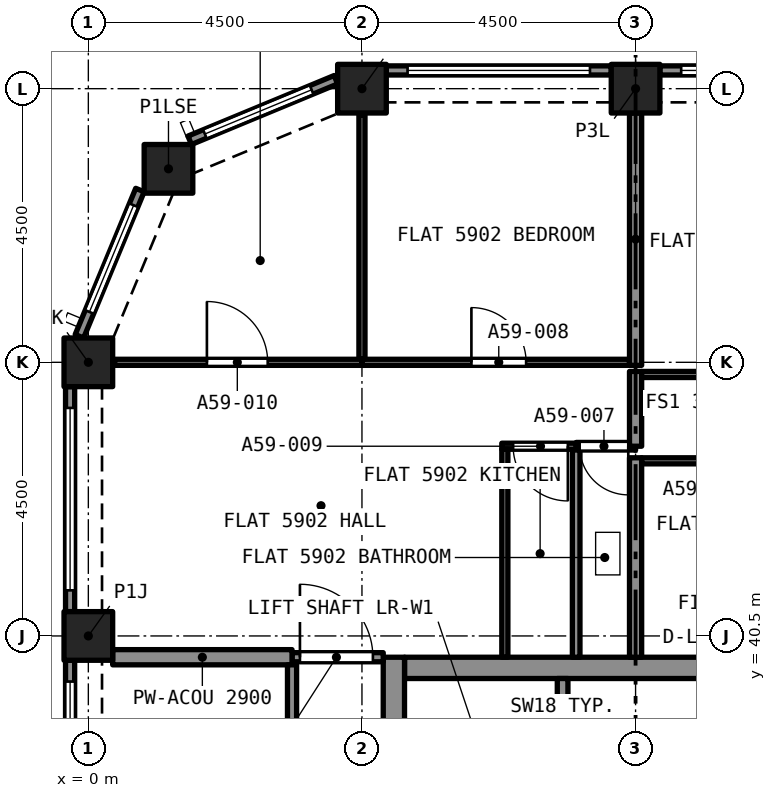
"""IFC4 building model, lengths in metres.
Left out: names, types, materials, properties, quantities, classifications, styles, units other than length and angle.
Written with IfcOpenShell. Run it as: python <this file> out.ifc"""

import sys

from ifc_helpers import new_model, si_unit, direction, frame, frame_2d, origin, origin_2d, place, context, subcontext, project, spatial, rectangle, extrude, element, fill, save


model = new_model("IFC4")
c1 = context("Model", 3, precision=1e-05, world=origin(), true_north=direction((0.0, 1.0)))
c2 = subcontext(c1, "Body", "Model", "MODEL_VIEW")
j1 = project(units=[si_unit("LENGTHUNIT", "METRE"), si_unit("PLANEANGLEUNIT", "RADIAN")], contexts=[c1])
p1 = place(None, origin())
s1 = spatial("IfcSite", under=j1, at=p1, CompositionType="ELEMENT")
p2 = place(p1, origin())
s2 = spatial("IfcBuilding", under=s1, at=p2, CompositionType="ELEMENT")
p3 = place(p2, frame((0.0, 0.0, 213.295)))
s3 = spatial("IfcBuildingStorey", under=s2, at=p3, CompositionType="ELEMENT", Elevation=213.295)
for number, where, z_axis, x_axis in (
    (1, (0.0, 40.5, 0.0), (0.0, 0.0, 1.0), (1.0, 0.0, 0.0)),
    (2, (0.0, 45.0, 0.0), (0.0, 0.0, 1.0), (1.0, 0.0, 0.0)),
    (3, (1.318, 48.182, 0.0), (0.0, 0.0, 1.0), (1.0, 0.0, 0.0)),
    (4, (4.5, 49.5, 0.0), (0.0, 0.0, 1.0), (1.0, 0.0, 0.0)),
    (5, (9.0, 49.5, 0.0), (0.0, 0.0, 1.0), (1.0, 0.0, 0.0)),
):
    element("IfcColumn", number, at=place(p3, frame(where, z_axis=z_axis, x_axis=x_axis)), inside=s3, PredefinedType="COLUMN", context=c2, shape_type="SweptSolid", body=[
        extrude(rectangle(XDim=0.8, YDim=0.8, at=origin_2d()), origin(), (0.0, 0.0, 1.0), 3.2),
    ])
p4 = place(p3, frame((5.2, 39.975, 0.0), z_axis=(0.0, 0.0, 1.0), x_axis=(1.0, 0.0, 0.0)))
e6 = element("IfcWall", 6, at=p4, inside=s3, PredefinedType="SOLIDWALL", context=c2, shape_type="SweptSolid", body=[
    extrude(rectangle(XDim=7.6, YDim=0.35, at=frame_2d((3.8, 0.0))), origin(), (0.0, 0.0, 1.0), 3.2),
])
p5 = place(p3, frame((5.025, 27.35, 0.0), z_axis=(0.0, 0.0, 1.0), x_axis=(0.0, 1.0, 0.0)))
e7 = element("IfcWall", 7, at=p5, inside=s3, PredefinedType="SOLIDWALL", context=c2, shape_type="SweptSolid", body=[
    extrude(rectangle(XDim=12.8, YDim=0.35, at=frame_2d((6.4, 0.0))), origin(), (0.0, 0.0, 1.0), 3.2),
])
p6 = place(p5, frame((8.6, 0.0, 0.0)))
e8 = element("IfcOpeningElement", 8, at=p6, cuts=e7, PredefinedType="OPENING", context=c2, shape_type="SweptSolid", body=[
    extrude(rectangle(XDim=1.2, YDim=2.1, at=frame_2d((0.6, 1.05))), frame((0.0, 0.185, 0.0), z_axis=(0.0, -1.0, 0.0), x_axis=(1.0, 0.0, 0.0)), (0.0, 0.0, 1.0), 0.37),
])
p7 = place(p3, frame((9.4, 49.8, 0.0), z_axis=(0.0, 0.0, 1.0), x_axis=(1.0, 0.0, 0.0)))
e9 = element("IfcWall", 9, at=p7, inside=s3, PredefinedType="SOLIDWALL", context=c2, shape_type="SweptSolid", body=[
    extrude(rectangle(XDim=3.7, YDim=0.15, at=frame_2d((1.85, 0.0))), origin(), (0.0, 0.0, 1.0), 3.2),
])
p8 = place(p7, frame((0.35, 0.0, 0.45)))
e10 = element("IfcOpeningElement", 10, at=p8, cuts=e9, PredefinedType="OPENING", context=c2, shape_type="SweptSolid", body=[
    extrude(rectangle(XDim=3.0, YDim=1.95, at=frame_2d((1.5, 0.975))), frame((0.0, 0.085, 0.0), z_axis=(0.0, -1.0, 0.0), x_axis=(1.0, 0.0, 0.0)), (0.0, 0.0, 1.0), 0.17),
])
p9 = place(p3, frame((4.9, 49.8, 0.0), z_axis=(0.0, 0.0, 1.0), x_axis=(1.0, 0.0, 0.0)))
e11 = element("IfcWall", 11, at=p9, inside=s3, PredefinedType="SOLIDWALL", context=c2, shape_type="SweptSolid", body=[
    extrude(rectangle(XDim=3.7, YDim=0.15, at=frame_2d((1.85, 0.0))), origin(), (0.0, 0.0, 1.0), 3.2),
])
p10 = place(p9, frame((0.35, 0.0, 0.45)))
e12 = element("IfcOpeningElement", 12, at=p10, cuts=e11, PredefinedType="OPENING", context=c2, shape_type="SweptSolid", body=[
    extrude(rectangle(XDim=3.0, YDim=1.95, at=frame_2d((1.5, 0.975))), frame((0.0, 0.085, 0.0), z_axis=(0.0, -1.0, 0.0), x_axis=(1.0, 0.0, 0.0)), (0.0, 0.0, 1.0), 0.17),
])
p11 = place(p3, frame((1.667, 48.651, 0.0), z_axis=(0.0, 0.0, 1.0), x_axis=(0.923885342263, 0.382669406082, 0.0)))
e13 = element("IfcWall", 13, at=p11, inside=s3, PredefinedType="SOLIDWALL", context=c2, shape_type="SweptSolid", body=[
    extrude(rectangle(XDim=2.602, YDim=0.15, at=frame_2d((1.301, 0.0))), origin(), (0.0, 0.0, 1.0), 3.2),
])
p12 = place(p11, frame((0.27, 0.0, 0.45)))
e14 = element("IfcOpeningElement", 14, at=p12, cuts=e13, PredefinedType="OPENING", context=c2, shape_type="SweptSolid", body=[
    extrude(rectangle(XDim=1.9, YDim=1.95, at=frame_2d((0.95, 0.975))), frame((0.0, 0.085, 0.0), z_axis=(0.0, -1.0, 0.0), x_axis=(1.0, 0.0, 0.0)), (0.0, 0.0, 1.0), 0.17),
])
p13 = place(p3, frame((-0.147, 45.429, 0.0), z_axis=(0.0, 0.0, 1.0), x_axis=(0.382669406082, 0.923885342263, 0.0)))
e15 = element("IfcWall", 15, at=p13, inside=s3, PredefinedType="SOLIDWALL", context=c2, shape_type="SweptSolid", body=[
    extrude(rectangle(XDim=2.602, YDim=0.15, at=frame_2d((1.301, 0.0))), origin(), (0.0, 0.0, 1.0), 3.2),
])
p14 = place(p13, frame((0.432, 0.0, 0.45)))
e16 = element("IfcOpeningElement", 16, at=p14, cuts=e15, PredefinedType="OPENING", context=c2, shape_type="SweptSolid", body=[
    extrude(rectangle(XDim=1.9, YDim=1.95, at=frame_2d((0.95, 0.975))), frame((0.0, 0.085, 0.0), z_axis=(0.0, -1.0, 0.0), x_axis=(1.0, 0.0, 0.0)), (0.0, 0.0, 1.0), 0.17),
])
p15 = place(p3, frame((-0.3, 40.9, 0.0), z_axis=(0.0, 0.0, 1.0), x_axis=(0.0, 1.0, 0.0)))
e17 = element("IfcWall", 17, at=p15, inside=s3, PredefinedType="SOLIDWALL", context=c2, shape_type="SweptSolid", body=[
    extrude(rectangle(XDim=3.7, YDim=0.15, at=frame_2d((1.85, 0.0))), origin(), (0.0, 0.0, 1.0), 3.2),
])
p16 = place(p15, frame((0.35, 0.0, 0.45)))
e18 = element("IfcOpeningElement", 18, at=p16, cuts=e17, PredefinedType="OPENING", context=c2, shape_type="SweptSolid", body=[
    extrude(rectangle(XDim=3.0, YDim=1.95, at=frame_2d((1.5, 0.975))), frame((0.0, 0.085, 0.0), z_axis=(0.0, -1.0, 0.0), x_axis=(1.0, 0.0, 0.0)), (0.0, 0.0, 1.0), 0.17),
])
p17 = place(p3, frame((-0.3, 36.4, 0.0), z_axis=(0.0, 0.0, 1.0), x_axis=(0.0, 1.0, 0.0)))
e19 = element("IfcWall", 19, at=p17, inside=s3, PredefinedType="SOLIDWALL", context=c2, shape_type="SweptSolid", body=[
    extrude(rectangle(XDim=3.7, YDim=0.15, at=frame_2d((1.85, 0.0))), origin(), (0.0, 0.0, 1.0), 3.2),
])
p18 = place(p17, frame((0.35, 0.0, 0.45)))
e20 = element("IfcOpeningElement", 20, at=p18, cuts=e19, PredefinedType="OPENING", context=c2, shape_type="SweptSolid", body=[
    extrude(rectangle(XDim=3.0, YDim=1.95, at=frame_2d((1.5, 0.975))), frame((0.0, 0.085, 0.0), z_axis=(0.0, -1.0, 0.0), x_axis=(1.0, 0.0, 0.0)), (0.0, 0.0, 1.0), 0.17),
])
p19 = place(p3, frame((9.0, 43.62, 0.0), z_axis=(0.0, 0.0, 1.0), x_axis=(-1.0, 0.0, 0.0)))
e21 = element("IfcWall", 21, at=p19, inside=s3, PredefinedType="PARTITIONING", context=c2, shape_type="SweptSolid", body=[
    extrude(rectangle(XDim=0.977, YDim=0.125, at=frame_2d((0.489, 0.0))), origin(), (0.0, 0.0, 1.0), 2.9),
])
p20 = place(p19, frame((0.12, 0.0, 0.0)))
e22 = element("IfcOpeningElement", 22, at=p20, cuts=e21, PredefinedType="OPENING", context=c2, shape_type="SweptSolid", body=[
    extrude(rectangle(XDim=0.8, YDim=2.1, at=frame_2d((0.4, 1.05))), frame((0.0, 0.073, 0.0), z_axis=(0.0, -1.0, 0.0), x_axis=(1.0, 0.0, 0.0)), (0.0, 0.0, 1.0), 0.145),
])
p21 = place(p3, frame((8.023, 40.15, 0.0), z_axis=(0.0, 0.0, 1.0), x_axis=(0.0, 1.0, 0.0)))
e23 = element("IfcWall", 23, at=p21, inside=s3, PredefinedType="PARTITIONING", context=c2, shape_type="SweptSolid", body=[
    extrude(rectangle(XDim=3.408, YDim=0.125, at=frame_2d((1.704, 0.0))), origin(), (0.0, 0.0, 1.0), 2.9),
])
p22 = place(p3, frame((9.0, 40.15, 0.0), z_axis=(0.0, 0.0, 1.0), x_axis=(0.0, 1.0, 0.0)))
e24 = element("IfcWall", 24, at=p22, inside=s3, PredefinedType="PARTITIONING", context=c2, shape_type="SweptSolid", body=[
    extrude(rectangle(XDim=3.28, YDim=0.2, at=frame_2d((1.64, 0.0))), origin(), (0.0, 0.0, 1.0), 2.9),
])
p23 = place(p3, frame((4.5, 45.0, 0.0), z_axis=(0.0, 0.0, 1.0), x_axis=(1.0, 0.0, 0.0)))
e25 = element("IfcWall", 25, at=p23, inside=s3, PredefinedType="PARTITIONING", context=c2, shape_type="SweptSolid", body=[
    extrude(rectangle(XDim=4.4, YDim=0.1, at=frame_2d((2.2, 0.0))), origin(), (0.0, 0.0, 1.0), 2.9),
])
p24 = place(p23, frame((1.8, 0.0, 0.0)))
e26 = element("IfcOpeningElement", 26, at=p24, cuts=e25, PredefinedType="OPENING", context=c2, shape_type="SweptSolid", body=[
    extrude(rectangle(XDim=0.9, YDim=2.1, at=frame_2d((0.45, 1.05))), frame((0.0, 0.06, 0.0), z_axis=(0.0, -1.0, 0.0), x_axis=(1.0, 0.0, 0.0)), (0.0, 0.0, 1.0), 0.12),
])
p25 = place(p3, frame((4.5, 45.05, 0.0), z_axis=(0.0, 0.0, 1.0), x_axis=(0.0, 1.0, 0.0)))
e27 = element("IfcWall", 27, at=p25, inside=s3, PredefinedType="PARTITIONING", context=c2, shape_type="SweptSolid", body=[
    extrude(rectangle(XDim=4.017, YDim=0.1, at=frame_2d((2.009, 0.0))), origin(), (0.0, 0.0, 1.0), 2.9),
])
p26 = place(p3, frame((9.0, 44.95, 0.0), z_axis=(0.0, 0.0, 1.0), x_axis=(0.0, 1.0, 0.0)))
e28 = element("IfcWall", 28, at=p26, inside=s3, PredefinedType="PARTITIONING", context=c2, shape_type="SweptSolid", body=[
    extrude(rectangle(XDim=4.15, YDim=0.2, at=frame_2d((2.075, 0.0))), origin(), (0.0, 0.0, 1.0), 2.9),
])
p27 = place(p3, frame((8.023, 43.62, 0.0), z_axis=(0.0, 0.0, 1.0), x_axis=(-1.0, 0.0, 0.0)))
e29 = element("IfcWall", 29, at=p27, inside=s3, PredefinedType="PARTITIONING", context=c2, shape_type="SweptSolid", body=[
    extrude(rectangle(XDim=1.223, YDim=0.1, at=frame_2d((0.611, 0.0))), origin(), (0.0, 0.0, 1.0), 2.9),
])
p28 = place(p27, frame((0.136, 0.0, 0.0)))
e30 = element("IfcOpeningElement", 30, at=p28, cuts=e29, PredefinedType="OPENING", context=c2, shape_type="SweptSolid", body=[
    extrude(rectangle(XDim=0.9, YDim=2.1, at=frame_2d((0.45, 1.05))), frame((0.0, 0.06, 0.0), z_axis=(0.0, -1.0, 0.0), x_axis=(1.0, 0.0, 0.0)), (0.0, 0.0, 1.0), 0.12),
])
p29 = place(p3, frame((6.85, 40.15, 0.0), z_axis=(0.0, 0.0, 1.0), x_axis=(0.0, 1.0, 0.0)))
e31 = element("IfcWall", 31, at=p29, inside=s3, PredefinedType="PARTITIONING", context=c2, shape_type="SweptSolid", body=[
    extrude(rectangle(XDim=3.42, YDim=0.1, at=frame_2d((1.71, 0.0))), origin(), (0.0, 0.0, 1.0), 2.9),
])
p30 = place(p3, frame((0.433, 45.0, 0.0), z_axis=(0.0, 0.0, 1.0), x_axis=(1.0, 0.0, 0.0)))
e32 = element("IfcWall", 32, at=p30, inside=s3, PredefinedType="PARTITIONING", context=c2, shape_type="SweptSolid", body=[
    extrude(rectangle(XDim=4.067, YDim=0.1, at=frame_2d((2.034, 0.0))), origin(), (0.0, 0.0, 1.0), 2.9),
])
p31 = place(p30, frame((1.517, 0.0, 0.0)))
e33 = element("IfcOpeningElement", 33, at=p31, cuts=e32, PredefinedType="OPENING", context=c2, shape_type="SweptSolid", body=[
    extrude(rectangle(XDim=1.0, YDim=2.1, at=frame_2d((0.5, 1.05))), frame((0.0, 0.06, 0.0), z_axis=(0.0, -1.0, 0.0), x_axis=(1.0, 0.0, 0.0)), (0.0, 0.0, 1.0), 0.12),
])
p32 = place(p3, frame((9.0, 43.62, 0.0), z_axis=(0.0, 0.0, 1.0), x_axis=(0.0, 1.0, 0.0)))
e34 = element("IfcWall", 34, at=p32, inside=s3, PredefinedType="PARTITIONING", context=c2, shape_type="SweptSolid", body=[
    extrude(rectangle(XDim=1.23, YDim=0.2, at=frame_2d((0.615, 0.0))), origin(), (0.0, 0.0, 1.0), 2.9),
])
p33 = place(p3, frame((3.35, 40.15, 0.0), z_axis=(0.0, 0.0, 1.0), x_axis=(1.0, 0.0, 0.0)))
e35 = element("IfcWall", 35, at=p33, inside=s3, PredefinedType="PARTITIONING", context=c2, shape_type="SweptSolid", body=[
    extrude(rectangle(XDim=1.5, YDim=0.15, at=frame_2d((0.75, 0.0))), origin(), (0.0, 0.0, 1.0), 2.9),
])
p34 = place(p33, frame((0.13, 0.0, 0.0)))
e36 = element("IfcOpeningElement", 36, at=p34, cuts=e35, PredefinedType="OPENING", context=c2, shape_type="SweptSolid", body=[
    extrude(rectangle(XDim=1.2, YDim=2.4, at=frame_2d((0.6, 1.2))), frame((0.0, 0.085, 0.0), z_axis=(0.0, -1.0, 0.0), x_axis=(1.0, 0.0, 0.0)), (0.0, 0.0, 1.0), 0.17),
])
p35 = place(p3, frame((0.4, 40.15, 0.0), z_axis=(0.0, 0.0, 1.0), x_axis=(1.0, 0.0, 0.0)))
e37 = element("IfcWall", 37, at=p35, inside=s3, PredefinedType="PARTITIONING", context=c2, shape_type="SweptSolid", body=[
    extrude(rectangle(XDim=2.95, YDim=0.25, at=frame_2d((1.475, 0.0))), origin(), (0.0, 0.0, 1.0), 2.9),
])
p36 = place(p3, frame((12.201, 43.38, 0.0), z_axis=(0.0, 0.0, 1.0), x_axis=(-1.0, 0.0, 0.0)))
e38 = element("IfcWall", 38, at=p36, inside=s3, PredefinedType="PARTITIONING", context=c2, shape_type="SweptSolid", body=[
    extrude(rectangle(XDim=3.101, YDim=0.1, at=frame_2d((1.55, 0.0))), origin(), (0.0, 0.0, 1.0), 2.9),
])
p37 = place(p36, frame((1.15, 0.0, 0.0)))
e39 = element("IfcOpeningElement", 39, at=p37, cuts=e38, PredefinedType="OPENING", context=c2, shape_type="SweptSolid", body=[
    extrude(rectangle(XDim=0.9, YDim=2.1, at=frame_2d((0.45, 1.05))), frame((0.0, 0.06, 0.0), z_axis=(0.0, -1.0, 0.0), x_axis=(1.0, 0.0, 0.0)), (0.0, 0.0, 1.0), 0.12),
])
p38 = place(p3, frame((9.1, 44.8, 0.0), z_axis=(0.0, 0.0, 1.0), x_axis=(1.0, 0.0, 0.0)))
e40 = element("IfcWall", 40, at=p38, inside=s3, PredefinedType="PARTITIONING", context=c2, shape_type="SweptSolid", body=[
    extrude(rectangle(XDim=4.4, YDim=0.1, at=frame_2d((2.2, 0.0))), origin(), (0.0, 0.0, 1.0), 2.9),
])
p39 = place(p38, frame((1.65, 0.0, 0.0)))
e41 = element("IfcOpeningElement", 41, at=p39, cuts=e40, PredefinedType="OPENING", context=c2, shape_type="SweptSolid", body=[
    extrude(rectangle(XDim=1.0, YDim=2.1, at=frame_2d((0.5, 1.05))), frame((0.0, 0.06, 0.0), z_axis=(0.0, -1.0, 0.0), x_axis=(1.0, 0.0, 0.0)), (0.0, 0.0, 1.0), 0.12),
])
p40 = place(p3, frame((3.35, 31.5, 0.0), z_axis=(0.0, 0.0, 1.0), x_axis=(0.0, 1.0, 0.0)))
e42 = element("IfcWall", 42, at=p40, inside=s3, PredefinedType="PARTITIONING", context=c2, shape_type="SweptSolid", body=[
    extrude(rectangle(XDim=8.525, YDim=0.15, at=frame_2d((4.262, 0.0))), origin(), (0.0, 0.0, 1.0), 2.9),
])
p41 = place(p40, frame((3.825, 0.0, 0.0)))
e43 = element("IfcOpeningElement", 43, at=p41, cuts=e42, PredefinedType="OPENING", context=c2, shape_type="SweptSolid", body=[
    extrude(rectangle(XDim=1.0, YDim=2.1, at=frame_2d((0.5, 1.05))), frame((0.0, 0.085, 0.0), z_axis=(0.0, -1.0, 0.0), x_axis=(1.0, 0.0, 0.0)), (0.0, 0.0, 1.0), 0.17),
])
p42 = place(p3, frame((7.8, 37.5, 0.0), z_axis=(0.0, 0.0, 1.0), x_axis=(0.0, 1.0, 0.0)))
e44 = element("IfcWall", 44, at=p42, inside=s3, PredefinedType="SOLIDWALL", context=c2, shape_type="SweptSolid", body=[
    extrude(rectangle(XDim=2.3, YDim=0.175, at=frame_2d((1.15, 0.0))), origin(), (0.0, 0.0, 1.0), 2.9),
])
p43 = place(p8, origin())
e45 = element("IfcWindow", 45, at=p43, inside=s3, PartitioningType="SINGLE_PANEL", PredefinedType="WINDOW", context=c2, shape_type="SweptSolid", body=[
    extrude(rectangle(XDim=3.0, YDim=1.95, at=frame_2d((1.5, 0.975))), frame((0.0, 0.03, 0.0), z_axis=(0.0, -1.0, 0.0), x_axis=(1.0, 0.0, 0.0)), (0.0, 0.0, 1.0), 0.06),
])
fill(e10, e45)
p44 = place(p10, origin())
e46 = element("IfcWindow", 46, at=p44, inside=s3, PartitioningType="SINGLE_PANEL", PredefinedType="WINDOW", context=c2, shape_type="SweptSolid", body=[
    extrude(rectangle(XDim=3.0, YDim=1.95, at=frame_2d((1.5, 0.975))), frame((0.0, 0.03, 0.0), z_axis=(0.0, -1.0, 0.0), x_axis=(1.0, 0.0, 0.0)), (0.0, 0.0, 1.0), 0.06),
])
fill(e12, e46)
p45 = place(p12, origin())
e47 = element("IfcWindow", 47, at=p45, inside=s3, PartitioningType="SINGLE_PANEL", PredefinedType="WINDOW", context=c2, shape_type="SweptSolid", body=[
    extrude(rectangle(XDim=1.9, YDim=1.95, at=frame_2d((0.95, 0.975))), frame((0.0, 0.03, 0.0), z_axis=(0.0, -1.0, 0.0), x_axis=(1.0, 0.0, 0.0)), (0.0, 0.0, 1.0), 0.06),
])
fill(e14, e47)
p46 = place(p14, origin())
e48 = element("IfcWindow", 48, at=p46, inside=s3, PartitioningType="SINGLE_PANEL", PredefinedType="WINDOW", context=c2, shape_type="SweptSolid", body=[
    extrude(rectangle(XDim=1.9, YDim=1.95, at=frame_2d((0.95, 0.975))), frame((0.0, 0.03, 0.0), z_axis=(0.0, -1.0, 0.0), x_axis=(1.0, 0.0, 0.0)), (0.0, 0.0, 1.0), 0.06),
])
fill(e16, e48)
p47 = place(p16, origin())
e49 = element("IfcWindow", 49, at=p47, inside=s3, PartitioningType="SINGLE_PANEL", PredefinedType="WINDOW", context=c2, shape_type="SweptSolid", body=[
    extrude(rectangle(XDim=3.0, YDim=1.95, at=frame_2d((1.5, 0.975))), frame((0.0, 0.03, 0.0), z_axis=(0.0, -1.0, 0.0), x_axis=(1.0, 0.0, 0.0)), (0.0, 0.0, 1.0), 0.06),
])
fill(e18, e49)
p48 = place(p18, origin())
e50 = element("IfcWindow", 50, at=p48, inside=s3, PartitioningType="SINGLE_PANEL", PredefinedType="WINDOW", context=c2, shape_type="SweptSolid", body=[
    extrude(rectangle(XDim=3.0, YDim=1.95, at=frame_2d((1.5, 0.975))), frame((0.0, 0.03, 0.0), z_axis=(0.0, -1.0, 0.0), x_axis=(1.0, 0.0, 0.0)), (0.0, 0.0, 1.0), 0.06),
])
fill(e20, e50)
p49 = place(p20, origin())
e51 = element("IfcDoor", 51, at=p49, inside=s3, OperationType="SINGLE_SWING_LEFT", PredefinedType="DOOR", context=c2, shape_type="SweptSolid", body=[
    extrude(rectangle(XDim=0.8, YDim=2.1, at=frame_2d((0.4, 1.05))), frame((0.0, 0.025, 0.0), z_axis=(0.0, -1.0, 0.0), x_axis=(1.0, 0.0, 0.0)), (0.0, 0.0, 1.0), 0.05),
])
fill(e22, e51)
p50 = place(p24, origin())
e52 = element("IfcDoor", 52, at=p50, inside=s3, OperationType="SINGLE_SWING_RIGHT", PredefinedType="DOOR", context=c2, shape_type="SweptSolid", body=[
    extrude(rectangle(XDim=0.9, YDim=2.1, at=frame_2d((0.45, 1.05))), frame((0.0, 0.025, 0.0), z_axis=(0.0, -1.0, 0.0), x_axis=(1.0, 0.0, 0.0)), (0.0, 0.0, 1.0), 0.05),
])
fill(e26, e52)
p51 = place(p28, origin())
e53 = element("IfcDoor", 53, at=p51, inside=s3, OperationType="SINGLE_SWING_LEFT", PredefinedType="DOOR", context=c2, shape_type="SweptSolid", body=[
    extrude(rectangle(XDim=0.9, YDim=2.1, at=frame_2d((0.45, 1.05))), frame((0.0, 0.025, 0.0), z_axis=(0.0, -1.0, 0.0), x_axis=(1.0, 0.0, 0.0)), (0.0, 0.0, 1.0), 0.05),
])
fill(e30, e53)
p52 = place(p31, origin())
e54 = element("IfcDoor", 54, at=p52, inside=s3, OperationType="SINGLE_SWING_LEFT", PredefinedType="DOOR", context=c2, shape_type="SweptSolid", body=[
    extrude(rectangle(XDim=1.0, YDim=2.1, at=frame_2d((0.5, 1.05))), frame((0.0, 0.025, 0.0), z_axis=(0.0, -1.0, 0.0), x_axis=(1.0, 0.0, 0.0)), (0.0, 0.0, 1.0), 0.05),
])
fill(e33, e54)
p53 = place(p34, origin())
e55 = element("IfcDoor", 55, at=p53, inside=s3, OperationType="SINGLE_SWING_LEFT", PredefinedType="DOOR", context=c2, shape_type="SweptSolid", body=[
    extrude(rectangle(XDim=1.2, YDim=2.4, at=frame_2d((0.6, 1.2))), frame((0.0, 0.025, 0.0), z_axis=(0.0, -1.0, 0.0), x_axis=(1.0, 0.0, 0.0)), (0.0, 0.0, 1.0), 0.05),
])
fill(e36, e55)
save(model, sys.argv[1])
